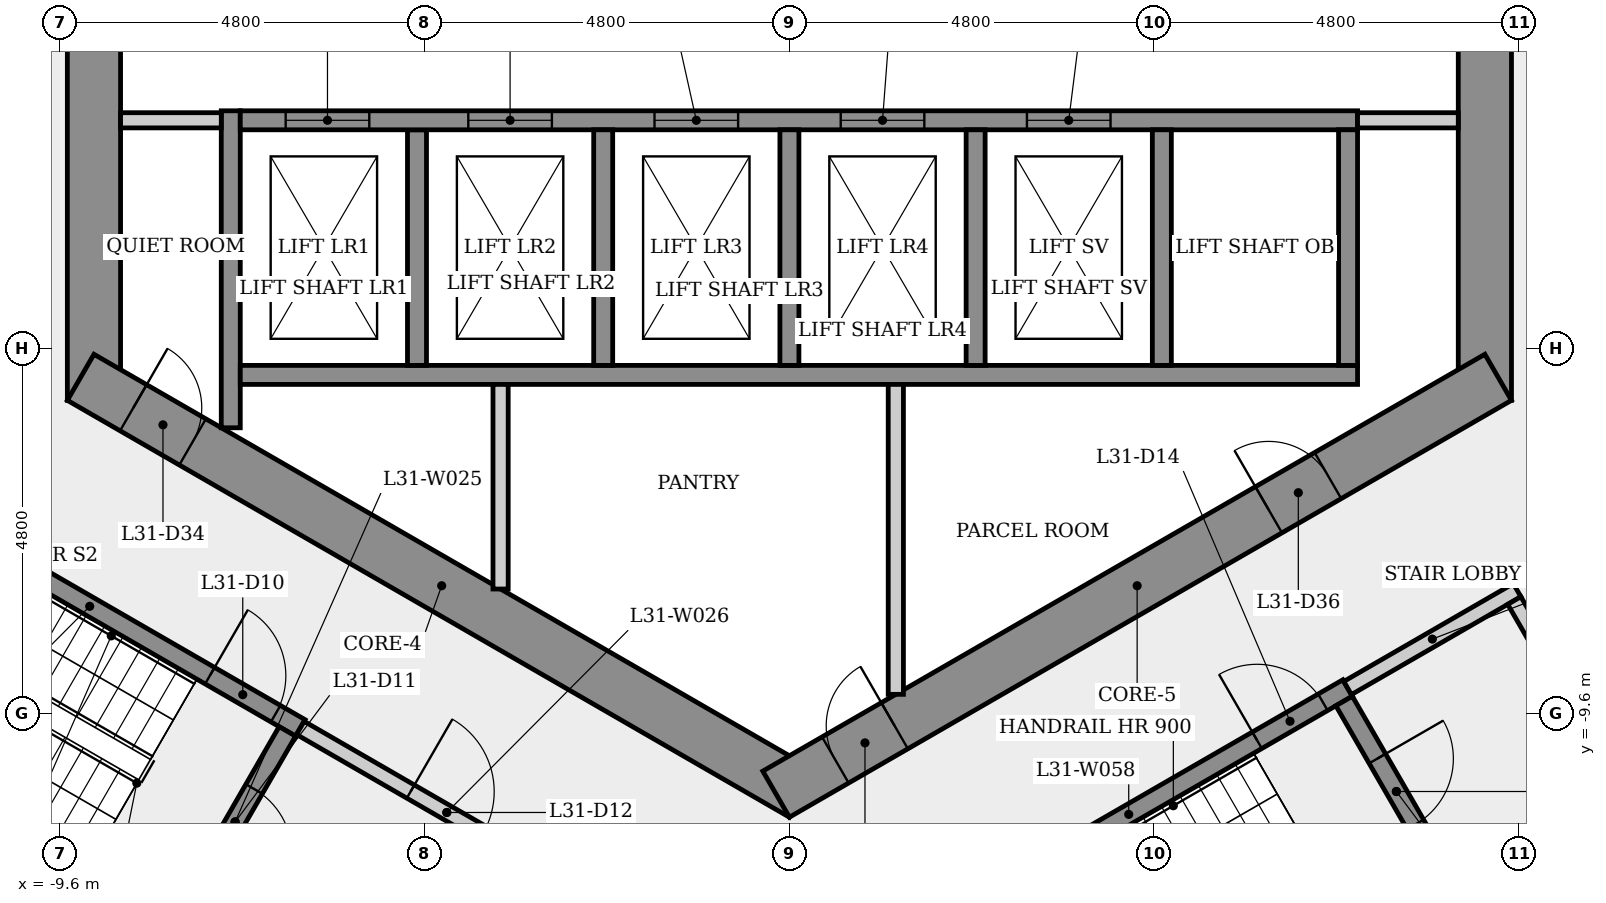
"""IFC4 building model, lengths in metres.
Left out: names, types, materials, properties, quantities, classifications, styles, units other than length and angle.
Written with IfcOpenShell. Run it as: python <this file> out.ifc"""

import sys

from ifc_helpers import new_model, si_unit, direction, frame, frame_2d, origin, place, context, subcontext, project, spatial, rectangle, extrude, element, fill, save


model = new_model("IFC4")
c1 = context("Model", 3, precision=1e-05, world=origin(), true_north=direction((0.0, 1.0)))
c2 = subcontext(c1, "Body", "Model", "MODEL_VIEW")
j1 = project(units=[si_unit("LENGTHUNIT", "METRE"), si_unit("PLANEANGLEUNIT", "RADIAN")], contexts=[c1])
p1 = place(None, origin())
s1 = spatial("IfcSite", under=j1, at=p1, CompositionType="ELEMENT")
p2 = place(p1, origin())
s2 = spatial("IfcBuilding", under=s1, at=p2, CompositionType="ELEMENT")
p3 = place(p2, frame((0.0, 0.0, 117.1)))
s3 = spatial("IfcBuildingStorey", under=s2, at=p3, CompositionType="ELEMENT", Elevation=117.1)
p4 = place(p3, frame((9.15, -5.485, 0.0), z_axis=(0.0, 0.0, 1.0), x_axis=(0.0, 1.0, 0.0)))
e1 = element("IfcWall", 1, at=p4, inside=s3, PredefinedType="SHEAR", context=c2, shape_type="SweptSolid", body=[
    extrude(rectangle(XDim=10.97, YDim=0.7, at=frame_2d((5.485, 0.0))), origin(), (0.0, 0.0, 1.0), 3.4),
])
p5 = place(p4, frame((4.685, 0.0, 0.0)))
e2 = element("IfcOpeningElement", 2, at=p5, cuts=e1, PredefinedType="OPENING", context=c2, shape_type="SweptSolid", body=[
    extrude(rectangle(XDim=1.6, YDim=2.1, at=frame_2d((0.8, 1.05))), frame((0.0, 0.36, 0.0), z_axis=(0.0, -1.0, 0.0), x_axis=(1.0, 0.0, 0.0)), (0.0, 0.0, 1.0), 0.72),
])
p6 = place(p3, frame((-9.15, 5.485, 0.0), z_axis=(0.0, 0.0, 1.0), x_axis=(0.0, -1.0, 0.0)))
e3 = element("IfcWall", 3, at=p6, inside=s3, PredefinedType="SHEAR", context=c2, shape_type="SweptSolid", body=[
    extrude(rectangle(XDim=10.97, YDim=0.7, at=frame_2d((5.485, 0.0))), origin(), (0.0, 0.0, 1.0), 3.4),
])
p7 = place(p6, frame((4.685, 0.0, 0.0)))
e4 = element("IfcOpeningElement", 4, at=p7, cuts=e3, PredefinedType="OPENING", context=c2, shape_type="SweptSolid", body=[
    extrude(rectangle(XDim=1.6, YDim=2.1, at=frame_2d((0.8, 1.05))), frame((0.0, 0.36, 0.0), z_axis=(0.0, -1.0, 0.0), x_axis=(1.0, 0.0, 0.0)), (0.0, 0.0, 1.0), 0.72),
])
p8 = place(p3, frame((-9.325, -5.182, 0.0), z_axis=(0.0, 0.0, 1.0), x_axis=(0.866023993627, -0.500002442456, 0.0)))
e5 = element("IfcWall", 5, at=p8, inside=s3, PredefinedType="SHEAR", context=c2, shape_type="SweptSolid", body=[
    extrude(rectangle(XDim=10.97, YDim=0.7, at=frame_2d((5.485, 0.0))), origin(), (0.0, 0.0, 1.0), 3.4),
])
p9 = place(p8, frame((0.801, 0.0, 0.0)))
e6 = element("IfcOpeningElement", 6, at=p9, cuts=e5, PredefinedType="OPENING", context=c2, shape_type="SweptSolid", body=[
    extrude(rectangle(XDim=0.9, YDim=2.1, at=frame_2d((0.45, 1.05))), frame((0.0, 0.36, 0.0), z_axis=(0.0, -1.0, 0.0), x_axis=(1.0, 0.0, 0.0)), (0.0, 0.0, 1.0), 0.72),
])
p10 = place(p3, frame((-0.175, -10.667, 0.0), z_axis=(0.0, 0.0, 1.0), x_axis=(0.866023993627, 0.500002442456, 0.0)))
e7 = element("IfcWall", 7, at=p10, inside=s3, PredefinedType="SHEAR", context=c2, shape_type="SweptSolid", body=[
    extrude(rectangle(XDim=10.97, YDim=0.7, at=frame_2d((5.485, 0.0))), origin(), (0.0, 0.0, 1.0), 3.4),
])
p11 = place(p10, frame((0.9, 0.0, 0.0)))
e8 = element("IfcOpeningElement", 8, at=p11, cuts=e7, PredefinedType="OPENING", context=c2, shape_type="SweptSolid", body=[
    extrude(rectangle(XDim=0.9, YDim=2.1, at=frame_2d((0.45, 1.05))), frame((0.0, 0.36, 0.0), z_axis=(0.0, -1.0, 0.0), x_axis=(1.0, 0.0, 0.0)), (0.0, 0.0, 1.0), 0.72),
])
p12 = place(p10, frame((7.483, 0.0, 0.0)))
e9 = element("IfcOpeningElement", 9, at=p12, cuts=e7, PredefinedType="OPENING", context=c2, shape_type="SweptSolid", body=[
    extrude(rectangle(XDim=0.9, YDim=2.1, at=frame_2d((0.45, 1.05))), frame((0.0, 0.36, 0.0), z_axis=(0.0, -1.0, 0.0), x_axis=(1.0, 0.0, 0.0)), (0.0, 0.0, 1.0), 0.72),
])
p13 = place(p3, frame((-11.977, -6.595, 0.0), z_axis=(0.0, 0.0, 1.0), x_axis=(0.866025499775, -0.499999833739, 0.0)))
e10 = element("IfcWall", 10, at=p13, inside=s3, PredefinedType="SHEAR", context=c2, shape_type="SweptSolid", body=[
    extrude(rectangle(XDim=6.4, YDim=0.25, at=frame_2d((3.2, 0.0))), origin(), (0.0, 0.0, 1.0), 3.0),
])
p14 = place(p13, frame((5.025, 0.0, 0.0)))
e11 = element("IfcOpeningElement", 11, at=p14, cuts=e10, PredefinedType="OPENING", context=c2, shape_type="SweptSolid", body=[
    extrude(rectangle(XDim=1.0, YDim=2.1, at=frame_2d((0.5, 1.05))), frame((0.0, 0.135, 0.0), z_axis=(0.0, -1.0, 0.0), x_axis=(1.0, 0.0, 0.0)), (0.0, 0.0, 1.0), 0.27),
])
p15 = place(p3, frame((-7.935, -12.393, 0.0), z_axis=(0.0, 0.0, 1.0), x_axis=(-0.866025499775, 0.499999833739, 0.0)))
e12 = element("IfcWall", 12, at=p15, inside=s3, PredefinedType="SHEAR", context=c2, shape_type="SweptSolid", body=[
    extrude(rectangle(XDim=6.4, YDim=0.25, at=frame_2d((3.2, 0.0))), origin(), (0.0, 0.0, 1.0), 3.0),
])
p16 = place(p3, frame((-7.35, -5.846, 0.0), z_axis=(0.0, 0.0, 1.0), x_axis=(0.0, 1.0, 0.0)))
e13 = element("IfcWall", 13, at=p16, inside=s3, PredefinedType="SHEAR", context=c2, shape_type="SweptSolid", body=[
    extrude(rectangle(XDim=4.171, YDim=0.25, at=frame_2d((2.085, 0.0))), origin(), (0.0, 0.0, 1.0), 3.0),
])
p17 = place(p3, frame((-7.475, -1.8, 0.0), z_axis=(0.0, 0.0, 1.0), x_axis=(-1.0, 0.0, 0.0)))
e14 = element("IfcWall", 14, at=p17, inside=s3, PredefinedType="PARTITIONING", context=c2, shape_type="SweptSolid", body=[
    extrude(rectangle(XDim=1.325, YDim=0.2, at=frame_2d((0.663, 0.0))), origin(), (0.0, 0.0, 1.0), 3.0),
])
p18 = place(p3, frame((-6.605, -9.841, 0.0), z_axis=(0.0, 0.0, 1.0), x_axis=(-0.499996545922, -0.866027397988, 0.0)))
e15 = element("IfcWall", 15, at=p18, inside=s3, PredefinedType="SHEAR", context=c2, shape_type="SweptSolid", body=[
    extrude(rectangle(XDim=2.75, YDim=0.25, at=frame_2d((1.375, 0.0))), origin(), (0.0, 0.0, 1.0), 3.0),
])
p19 = place(p18, frame((0.875, 0.0, 0.0)))
e16 = element("IfcOpeningElement", 16, at=p19, cuts=e15, PredefinedType="OPENING", context=c2, shape_type="SweptSolid", body=[
    extrude(rectangle(XDim=1.0, YDim=2.1, at=frame_2d((0.5, 1.05))), frame((0.0, 0.135, 0.0), z_axis=(0.0, -1.0, 0.0), x_axis=(1.0, 0.0, 0.0)), (0.0, 0.0, 1.0), 0.27),
])
p20 = place(p3, frame((-6.435, -9.795, 0.0), z_axis=(0.0, 0.0, 1.0), x_axis=(0.866012907634, -0.500021643343, 0.0)))
e17 = element("IfcWall", 17, at=p20, inside=s3, PredefinedType="PARTITIONING", context=c2, shape_type="SweptSolid", body=[
    extrude(rectangle(XDim=4.45, YDim=0.2, at=frame_2d((2.225, 0.0))), origin(), (0.0, 0.0, 1.0), 3.0),
])
p21 = place(p20, frame((1.675, 0.0, 0.0)))
e18 = element("IfcOpeningElement", 18, at=p21, cuts=e17, PredefinedType="OPENING", context=c2, shape_type="SweptSolid", body=[
    extrude(rectangle(XDim=1.1, YDim=2.1, at=frame_2d((0.55, 1.05))), frame((0.0, 0.11, 0.0), z_axis=(0.0, -1.0, 0.0), x_axis=(1.0, 0.0, 0.0)), (0.0, 0.0, 1.0), 0.22),
])
p22 = place(p3, frame((-7.225, -5.15, 0.0), z_axis=(0.0, 0.0, 1.0), x_axis=(1.0, 0.0, 0.0)))
e19 = element("IfcWall", 19, at=p22, inside=s3, PredefinedType="SHEAR", context=c2, shape_type="SweptSolid", body=[
    extrude(rectangle(XDim=14.7, YDim=0.25, at=frame_2d((7.35, 0.0))), origin(), (0.0, 0.0, 1.0), 3.0),
])
p23 = place(p3, frame((-4.9, -1.925, 0.0), z_axis=(0.0, 0.0, 1.0), x_axis=(0.0, -1.0, 0.0)))
e20 = element("IfcWall", 20, at=p23, inside=s3, PredefinedType="SHEAR", context=c2, shape_type="SweptSolid", body=[
    extrude(rectangle(XDim=3.1, YDim=0.25, at=frame_2d((1.55, 0.0))), origin(), (0.0, 0.0, 1.0), 3.4),
])
p24 = place(p3, frame((-7.225, -1.8, 0.0), z_axis=(0.0, 0.0, 1.0), x_axis=(1.0, 0.0, 0.0)))
e21 = element("IfcWall", 21, at=p24, inside=s3, PredefinedType="SHEAR", context=c2, shape_type="SweptSolid", body=[
    extrude(rectangle(XDim=14.7, YDim=0.25, at=frame_2d((7.35, 0.0))), origin(), (0.0, 0.0, 1.0), 3.0),
])
p25 = place(p24, frame((0.597, 0.0, 0.0)))
e22 = element("IfcOpeningElement", 22, at=p25, cuts=e21, PredefinedType="OPENING", context=c2, shape_type="SweptSolid", body=[
    extrude(rectangle(XDim=1.1, YDim=2.1, at=frame_2d((0.55, 1.05))), frame((0.0, 0.135, 0.0), z_axis=(0.0, -1.0, 0.0), x_axis=(1.0, 0.0, 0.0)), (0.0, 0.0, 1.0), 0.27),
])
p26 = place(p24, frame((3.0, 0.0, 0.0)))
e23 = element("IfcOpeningElement", 23, at=p26, cuts=e21, PredefinedType="OPENING", context=c2, shape_type="SweptSolid", body=[
    extrude(rectangle(XDim=1.1, YDim=2.1, at=frame_2d((0.55, 1.05))), frame((0.0, 0.135, 0.0), z_axis=(0.0, -1.0, 0.0), x_axis=(1.0, 0.0, 0.0)), (0.0, 0.0, 1.0), 0.27),
])
p27 = place(p24, frame((5.45, 0.0, 0.0)))
e24 = element("IfcOpeningElement", 24, at=p27, cuts=e21, PredefinedType="OPENING", context=c2, shape_type="SweptSolid", body=[
    extrude(rectangle(XDim=1.1, YDim=2.1, at=frame_2d((0.55, 1.05))), frame((0.0, 0.135, 0.0), z_axis=(0.0, -1.0, 0.0), x_axis=(1.0, 0.0, 0.0)), (0.0, 0.0, 1.0), 0.27),
])
p28 = place(p24, frame((7.9, 0.0, 0.0)))
e25 = element("IfcOpeningElement", 25, at=p28, cuts=e21, PredefinedType="OPENING", context=c2, shape_type="SweptSolid", body=[
    extrude(rectangle(XDim=1.1, YDim=2.1, at=frame_2d((0.55, 1.05))), frame((0.0, 0.135, 0.0), z_axis=(0.0, -1.0, 0.0), x_axis=(1.0, 0.0, 0.0)), (0.0, 0.0, 1.0), 0.27),
])
p29 = place(p24, frame((10.35, 0.0, 0.0)))
e26 = element("IfcOpeningElement", 26, at=p29, cuts=e21, PredefinedType="OPENING", context=c2, shape_type="SweptSolid", body=[
    extrude(rectangle(XDim=1.1, YDim=2.1, at=frame_2d((0.55, 1.05))), frame((0.0, 0.135, 0.0), z_axis=(0.0, -1.0, 0.0), x_axis=(1.0, 0.0, 0.0)), (0.0, 0.0, 1.0), 0.27),
])
p30 = place(p3, frame((-3.8, -5.275, 0.0), z_axis=(0.0, 0.0, 1.0), x_axis=(0.0, -1.0, 0.0)))
e27 = element("IfcWall", 27, at=p30, inside=s3, PredefinedType="PARTITIONING", context=c2, shape_type="SweptSolid", body=[
    extrude(rectangle(XDim=2.692, YDim=0.2, at=frame_2d((1.346, 0.0))), origin(), (0.0, 0.0, 1.0), 3.0),
])
for number, where, z_axis, x_axis in (
    (28, (-2.45, -1.925, 0.0), (0.0, 0.0, 1.0), (0.0, -1.0, 0.0)),
    (29, (0.0, -1.925, 0.0), (0.0, 0.0, 1.0), (0.0, -1.0, 0.0)),
):
    element("IfcWall", number, at=place(p3, frame(where, z_axis=z_axis, x_axis=x_axis)), inside=s3, PredefinedType="SHEAR", context=c2, shape_type="SweptSolid", body=[
        extrude(rectangle(XDim=3.1, YDim=0.25, at=frame_2d((1.55, 0.0))), origin(), (0.0, 0.0, 1.0), 3.4),
    ])
p31 = place(p3, frame((1.4, -5.275, 0.0), z_axis=(0.0, 0.0, 1.0), x_axis=(0.0, -1.0, 0.0)))
e30 = element("IfcWall", 30, at=p31, inside=s3, PredefinedType="PARTITIONING", context=c2, shape_type="SweptSolid", body=[
    extrude(rectangle(XDim=4.078, YDim=0.2, at=frame_2d((2.039, 0.0))), origin(), (0.0, 0.0, 1.0), 3.0),
])
p32 = place(p3, frame((1.585, -12.595, 0.0), z_axis=(0.0, 0.0, 1.0), x_axis=(0.866036417653, 0.499980922934, 0.0)))
e31 = element("IfcWall", 31, at=p32, inside=s3, PredefinedType="SHEAR", context=c2, shape_type="SweptSolid", body=[
    extrude(rectangle(XDim=6.65, YDim=0.25, at=frame_2d((3.325, 0.0))), origin(), (0.0, 0.0, 1.0), 3.0),
])
p33 = place(p32, frame((5.275, 0.0, 0.0)))
e32 = element("IfcOpeningElement", 32, at=p33, cuts=e31, PredefinedType="OPENING", context=c2, shape_type="SweptSolid", body=[
    extrude(rectangle(XDim=1.0, YDim=2.1, at=frame_2d((0.5, 1.05))), frame((0.0, 0.135, 0.0), z_axis=(0.0, -1.0, 0.0), x_axis=(1.0, 0.0, 0.0)), (0.0, 0.0, 1.0), 0.27),
])
for number, where, z_axis, x_axis in (
    (33, (2.45, -1.925, 0.0), (0.0, 0.0, 1.0), (0.0, -1.0, 0.0)),
    (34, (4.9, -1.925, 0.0), (0.0, 0.0, 1.0), (0.0, -1.0, 0.0)),
):
    element("IfcWall", number, at=place(p3, frame(where, z_axis=z_axis, x_axis=x_axis)), inside=s3, PredefinedType="SHEAR", context=c2, shape_type="SweptSolid", body=[
        extrude(rectangle(XDim=3.1, YDim=0.25, at=frame_2d((1.55, 0.0))), origin(), (0.0, 0.0, 1.0), 3.4),
    ])
p34 = place(p3, frame((7.298, -9.441, 0.0), z_axis=(0.0, 0.0, 1.0), x_axis=(0.500034990121, -0.866005201286, 0.0)))
e35 = element("IfcWall", 35, at=p34, inside=s3, PredefinedType="SHEAR", context=c2, shape_type="SweptSolid", body=[
    extrude(rectangle(XDim=2.75, YDim=0.25, at=frame_2d((1.375, 0.0))), origin(), (0.0, 0.0, 1.0), 3.0),
])
p35 = place(p34, frame((0.875, 0.0, 0.0)))
e36 = element("IfcOpeningElement", 36, at=p35, cuts=e35, PredefinedType="OPENING", context=c2, shape_type="SweptSolid", body=[
    extrude(rectangle(XDim=1.0, YDim=2.1, at=frame_2d((0.5, 1.05))), frame((0.0, 0.135, 0.0), z_axis=(0.0, -1.0, 0.0), x_axis=(1.0, 0.0, 0.0)), (0.0, 0.0, 1.0), 0.27),
])
p36 = place(p3, frame((7.344, -9.27, 0.0), z_axis=(0.0, 0.0, 1.0), x_axis=(0.866005588531, 0.500034319456, 0.0)))
e37 = element("IfcWall", 37, at=p36, inside=s3, PredefinedType="PARTITIONING", context=c2, shape_type="SweptSolid", body=[
    extrude(rectangle(XDim=2.575, YDim=0.2, at=frame_2d((1.288, 0.0))), origin(), (0.0, 0.0, 1.0), 3.0),
])
p37 = place(p3, frame((7.35, -1.925, 0.0), z_axis=(0.0, 0.0, 1.0), x_axis=(0.0, -1.0, 0.0)))
e38 = element("IfcWall", 38, at=p37, inside=s3, PredefinedType="SHEAR", context=c2, shape_type="SweptSolid", body=[
    extrude(rectangle(XDim=3.1, YDim=0.25, at=frame_2d((1.55, 0.0))), origin(), (0.0, 0.0, 1.0), 3.4),
])
p38 = place(p3, frame((8.8, -1.8, 0.0), z_axis=(0.0, 0.0, 1.0), x_axis=(-1.0, 0.0, 0.0)))
e39 = element("IfcWall", 39, at=p38, inside=s3, PredefinedType="PARTITIONING", context=c2, shape_type="SweptSolid", body=[
    extrude(rectangle(XDim=1.325, YDim=0.2, at=frame_2d((0.663, 0.0))), origin(), (0.0, 0.0, 1.0), 3.0),
])
p39 = place(p3, frame((9.537, -8.119, 0.0), z_axis=(0.0, 0.0, 1.0), x_axis=(0.499990139034, -0.866031096941, 0.0)))
e40 = element("IfcWall", 40, at=p39, inside=s3, PredefinedType="PARTITIONING", context=c2, shape_type="SweptSolid", body=[
    extrude(rectangle(XDim=3.0, YDim=0.2, at=frame_2d((1.5, 0.0))), origin(), (0.0, 0.0, 1.0), 3.0),
])
p40 = place(p39, frame((0.935, 0.0, 0.0)))
e41 = element("IfcOpeningElement", 41, at=p40, cuts=e40, PredefinedType="OPENING", context=c2, shape_type="SweptSolid", body=[
    extrude(rectangle(XDim=1.0, YDim=2.1, at=frame_2d((0.5, 1.05))), frame((0.0, 0.11, 0.0), z_axis=(0.0, -1.0, 0.0), x_axis=(1.0, 0.0, 0.0)), (0.0, 0.0, 1.0), 0.22),
])
p41 = place(p3, frame((10.901, -10.681, 0.0), z_axis=(0.0, 0.0, 1.0), x_axis=(-0.866007538022, -0.500030943131, 0.0)))
e42 = element("IfcWall", 42, at=p41, inside=s3, PredefinedType="PARTITIONING", context=c2, shape_type="SweptSolid", body=[
    extrude(rectangle(XDim=2.375, YDim=0.2, at=frame_2d((1.188, 0.0))), origin(), (0.0, 0.0, 1.0), 3.0),
])
p42 = place(p25, origin())
e43 = element("IfcDoor", 43, at=p42, inside=s3, OperationType="SLIDING_TO_LEFT", PredefinedType="DOOR", context=c2, shape_type="SweptSolid", body=[
    extrude(rectangle(XDim=1.1, YDim=2.1, at=frame_2d((0.55, 1.05))), frame((0.0, 0.025, 0.0), z_axis=(0.0, -1.0, 0.0), x_axis=(1.0, 0.0, 0.0)), (0.0, 0.0, 1.0), 0.05),
])
fill(e22, e43)
p43 = place(p26, origin())
e44 = element("IfcDoor", 44, at=p43, inside=s3, OperationType="SLIDING_TO_LEFT", PredefinedType="DOOR", context=c2, shape_type="SweptSolid", body=[
    extrude(rectangle(XDim=1.1, YDim=2.1, at=frame_2d((0.55, 1.05))), frame((0.0, 0.025, 0.0), z_axis=(0.0, -1.0, 0.0), x_axis=(1.0, 0.0, 0.0)), (0.0, 0.0, 1.0), 0.05),
])
fill(e23, e44)
p44 = place(p27, origin())
e45 = element("IfcDoor", 45, at=p44, inside=s3, OperationType="SLIDING_TO_LEFT", PredefinedType="DOOR", context=c2, shape_type="SweptSolid", body=[
    extrude(rectangle(XDim=1.1, YDim=2.1, at=frame_2d((0.55, 1.05))), frame((0.0, 0.025, 0.0), z_axis=(0.0, -1.0, 0.0), x_axis=(1.0, 0.0, 0.0)), (0.0, 0.0, 1.0), 0.05),
])
fill(e24, e45)
p45 = place(p28, origin())
e46 = element("IfcDoor", 46, at=p45, inside=s3, OperationType="SLIDING_TO_LEFT", PredefinedType="DOOR", context=c2, shape_type="SweptSolid", body=[
    extrude(rectangle(XDim=1.1, YDim=2.1, at=frame_2d((0.55, 1.05))), frame((0.0, 0.025, 0.0), z_axis=(0.0, -1.0, 0.0), x_axis=(1.0, 0.0, 0.0)), (0.0, 0.0, 1.0), 0.05),
])
fill(e25, e46)
p46 = place(p29, origin())
e47 = element("IfcDoor", 47, at=p46, inside=s3, OperationType="SLIDING_TO_LEFT", PredefinedType="DOOR", context=c2, shape_type="SweptSolid", body=[
    extrude(rectangle(XDim=1.1, YDim=2.1, at=frame_2d((0.55, 1.05))), frame((0.0, 0.025, 0.0), z_axis=(0.0, -1.0, 0.0), x_axis=(1.0, 0.0, 0.0)), (0.0, 0.0, 1.0), 0.05),
])
fill(e26, e47)
p47 = place(p14, origin())
e48 = element("IfcDoor", 48, at=p47, inside=s3, OperationType="SINGLE_SWING_LEFT", PredefinedType="DOOR", context=c2, shape_type="SweptSolid", body=[
    extrude(rectangle(XDim=1.0, YDim=2.1, at=frame_2d((0.5, 1.05))), frame((0.0, 0.025, 0.0), z_axis=(0.0, -1.0, 0.0), x_axis=(1.0, 0.0, 0.0)), (0.0, 0.0, 1.0), 0.05),
])
fill(e11, e48)
p48 = place(p19, origin())
e49 = element("IfcDoor", 49, at=p48, inside=s3, OperationType="SINGLE_SWING_RIGHT", PredefinedType="DOOR", context=c2, shape_type="SweptSolid", body=[
    extrude(rectangle(XDim=1.0, YDim=2.1, at=frame_2d((0.5, 1.05))), frame((0.0, 0.025, 0.0), z_axis=(0.0, -1.0, 0.0), x_axis=(1.0, 0.0, 0.0)), (0.0, 0.0, 1.0), 0.05),
])
fill(e16, e49)
p49 = place(p21, origin())
e50 = element("IfcDoor", 50, at=p49, inside=s3, OperationType="SINGLE_SWING_LEFT", PredefinedType="DOOR", context=c2, shape_type="SweptSolid", body=[
    extrude(rectangle(XDim=1.1, YDim=2.1, at=frame_2d((0.55, 1.05))), frame((0.0, 0.025, 0.0), z_axis=(0.0, -1.0, 0.0), x_axis=(1.0, 0.0, 0.0)), (0.0, 0.0, 1.0), 0.05),
])
fill(e18, e50)
p50 = place(p33, origin())
e51 = element("IfcDoor", 51, at=p50, inside=s3, OperationType="SINGLE_SWING_LEFT", PredefinedType="DOOR", context=c2, shape_type="SweptSolid", body=[
    extrude(rectangle(XDim=1.0, YDim=2.1, at=frame_2d((0.5, 1.05))), frame((0.0, 0.025, 0.0), z_axis=(0.0, -1.0, 0.0), x_axis=(1.0, 0.0, 0.0)), (0.0, 0.0, 1.0), 0.05),
])
fill(e32, e51)
p51 = place(p35, origin())
e52 = element("IfcDoor", 52, at=p51, inside=s3, OperationType="SINGLE_SWING_LEFT", PredefinedType="DOOR", context=c2, shape_type="SweptSolid", body=[
    extrude(rectangle(XDim=1.0, YDim=2.1, at=frame_2d((0.5, 1.05))), frame((0.0, 0.025, 0.0), z_axis=(0.0, -1.0, 0.0), x_axis=(1.0, 0.0, 0.0)), (0.0, 0.0, 1.0), 0.05),
])
fill(e36, e52)
p52 = place(p9, origin())
e53 = element("IfcDoor", 53, at=p52, inside=s3, OperationType="SINGLE_SWING_LEFT", PredefinedType="DOOR", context=c2, shape_type="SweptSolid", body=[
    extrude(rectangle(XDim=0.9, YDim=2.1, at=frame_2d((0.45, 1.05))), frame((0.0, 0.025, 0.0), z_axis=(0.0, -1.0, 0.0), x_axis=(1.0, 0.0, 0.0)), (0.0, 0.0, 1.0), 0.05),
])
fill(e6, e53)
p53 = place(p11, origin())
e54 = element("IfcDoor", 54, at=p53, inside=s3, OperationType="SINGLE_SWING_RIGHT", PredefinedType="DOOR", context=c2, shape_type="SweptSolid", body=[
    extrude(rectangle(XDim=0.9, YDim=2.1, at=frame_2d((0.45, 1.05))), frame((0.0, 0.025, 0.0), z_axis=(0.0, -1.0, 0.0), x_axis=(1.0, 0.0, 0.0)), (0.0, 0.0, 1.0), 0.05),
])
fill(e8, e54)
p54 = place(p12, origin())
e55 = element("IfcDoor", 55, at=p54, inside=s3, OperationType="SINGLE_SWING_LEFT", PredefinedType="DOOR", context=c2, shape_type="SweptSolid", body=[
    extrude(rectangle(XDim=0.9, YDim=2.1, at=frame_2d((0.45, 1.05))), frame((0.0, 0.025, 0.0), z_axis=(0.0, -1.0, 0.0), x_axis=(1.0, 0.0, 0.0)), (0.0, 0.0, 1.0), 0.05),
])
fill(e9, e55)
save(model, sys.argv[1])
